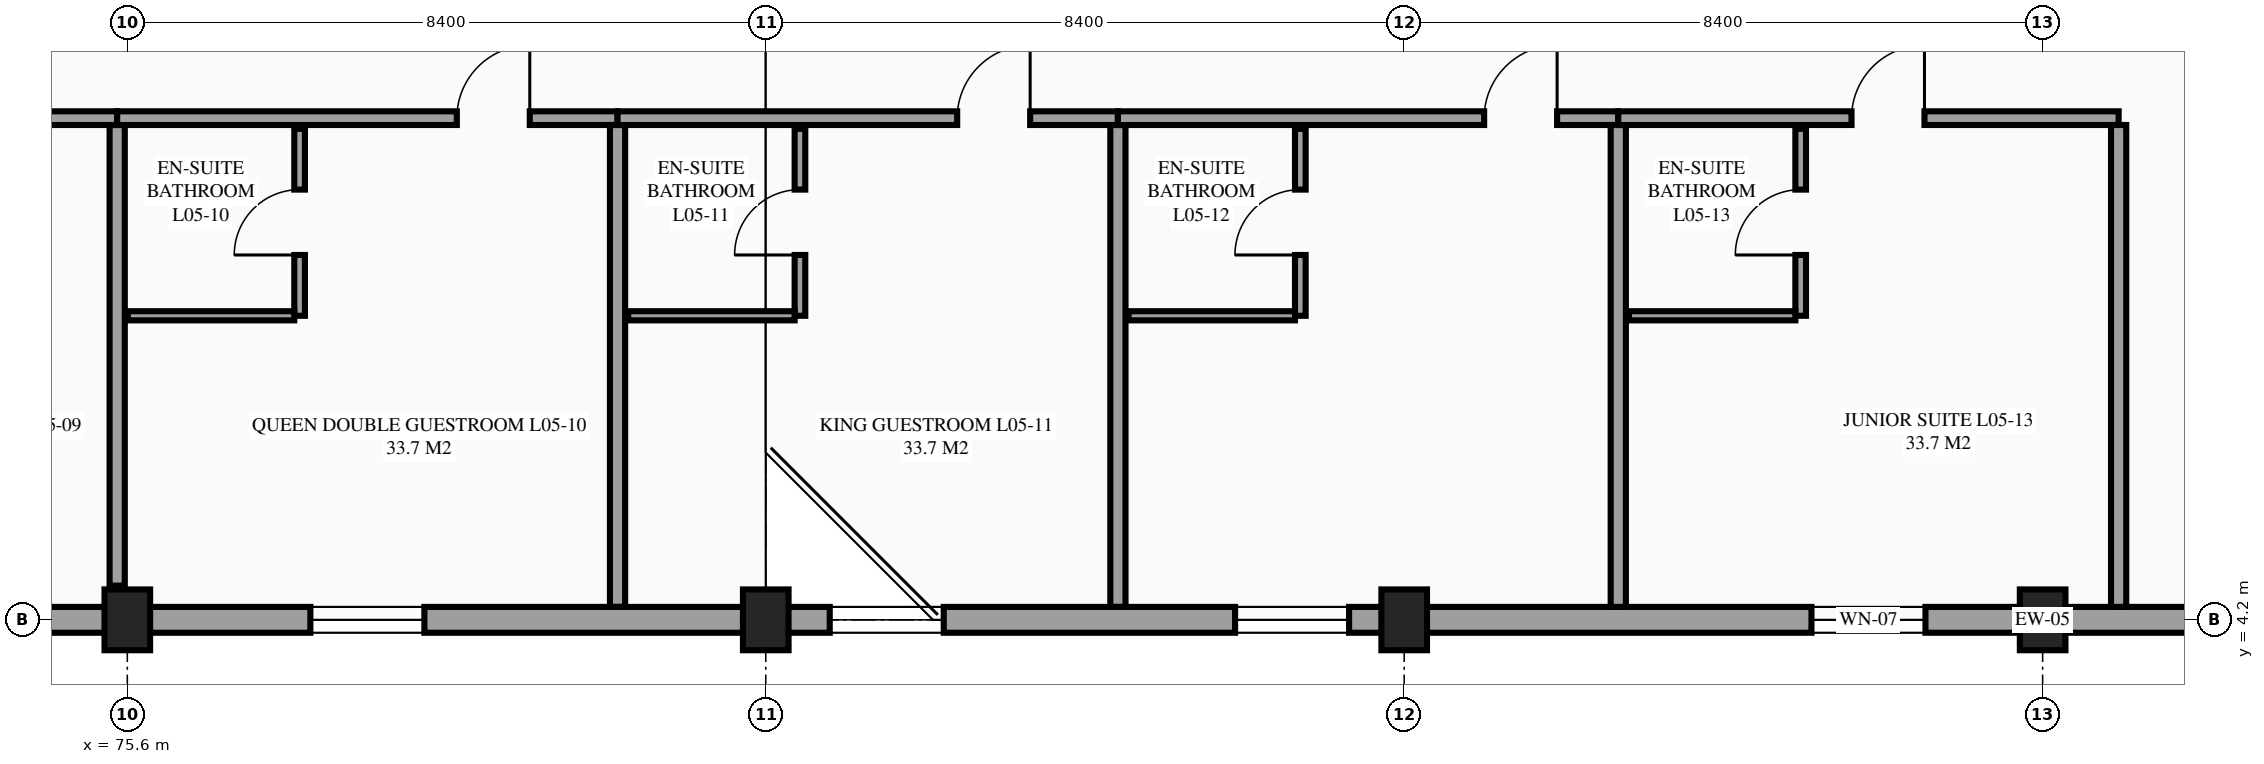
"""IFC4 building model, lengths in metres.
Left out: names, types, materials, properties, quantities, classifications, styles, units other than length and angle.
Written with IfcOpenShell. Run it as: python <this file> out.ifc"""

import sys

from ifc_helpers import new_model, si_unit, direction, frame, frame_2d, origin, origin_2d, place, context, subcontext, project, spatial, rectangle, extrude, element, fill, save


model = new_model("IFC4")
c1 = context("Model", 3, precision=1e-05, world=origin(), true_north=direction((0.0, 1.0)))
c2 = subcontext(c1, "Body", "Model", "MODEL_VIEW")
j1 = project(units=[si_unit("LENGTHUNIT", "METRE"), si_unit("PLANEANGLEUNIT", "RADIAN")], contexts=[c1])
p1 = place(None, origin())
s1 = spatial("IfcSite", under=j1, at=p1, CompositionType="ELEMENT")
p2 = place(p1, origin())
s2 = spatial("IfcBuilding", under=s1, at=p2, CompositionType="ELEMENT")
p3 = place(p2, frame((0.0, 0.0, 21.9)))
s3 = spatial("IfcBuildingStorey", under=s2, at=p3, CompositionType="ELEMENT", Elevation=21.9)
for number, where, z_axis, x_axis in (
    (1, (75.6, 4.2, 0.0), (0.0, 0.0, 1.0), (1.0, 0.0, 0.0)),
    (2, (84.0, 4.2, 0.0), (0.0, 0.0, 1.0), (1.0, 0.0, 0.0)),
    (3, (92.4, 4.2, 0.0), (0.0, 0.0, 1.0), (1.0, 0.0, 0.0)),
    (4, (100.8, 4.2, 0.0), (0.0, 0.0, 1.0), (1.0, 0.0, 0.0)),
):
    element("IfcColumn", number, at=place(p3, frame(where, z_axis=z_axis, x_axis=x_axis)), inside=s3, PredefinedType="COLUMN", context=c2, shape_type="SweptSolid", body=[
        extrude(rectangle(XDim=0.6, YDim=0.8, at=origin_2d()), origin(), (0.0, 0.0, 1.0), 3.6),
    ])
p4 = place(p3, frame((92.4, 4.2, 0.0), z_axis=(0.0, 0.0, 1.0), x_axis=(1.0, 0.0, 0.0)))
e5 = element("IfcWall", 5, at=p4, inside=s3, PredefinedType="STANDARD", context=c2, shape_type="SweptSolid", body=[
    extrude(rectangle(XDim=16.8, YDim=0.34, at=frame_2d((8.4, 0.0))), origin(), (0.0, 0.0, 1.0), 2.63),
])
p5 = place(p4, frame((5.358, 0.0, 0.85)))
e6 = element("IfcOpeningElement", 6, at=p5, cuts=e5, PredefinedType="OPENING", context=c2, shape_type="SweptSolid", body=[
    extrude(rectangle(XDim=1.5, YDim=1.5, at=frame_2d((0.75, 0.75))), frame((0.0, 0.18, 0.0), z_axis=(0.0, -1.0, 0.0), x_axis=(1.0, 0.0, 0.0)), (0.0, 0.0, 1.0), 0.36),
])
p6 = place(p3, frame((68.883, 10.8, 0.0), z_axis=(0.0, 0.0, 1.0), x_axis=(1.0, 0.0, 0.0)))
e7 = element("IfcWall", 7, at=p6, inside=s3, PredefinedType="PARTITIONING", context=c2, shape_type="SweptSolid", body=[
    extrude(rectangle(XDim=6.583, YDim=0.18, at=frame_2d((3.292, 0.0))), origin(), (0.0, 0.0, 1.0), 3.375),
])
p7 = place(p6, frame((4.469, 0.0, 0.0)))
e8 = element("IfcOpeningElement", 8, at=p7, cuts=e7, PredefinedType="OPENING", context=c2, shape_type="SweptSolid", body=[
    extrude(rectangle(XDim=0.96, YDim=2.15, at=frame_2d((0.48, 1.075))), frame((0.0, 0.1, 0.0), z_axis=(0.0, -1.0, 0.0), x_axis=(1.0, 0.0, 0.0)), (0.0, 0.0, 1.0), 0.2),
])
p8 = place(p3, frame((75.467, 4.65, 0.0), z_axis=(0.0, 0.0, 1.0), x_axis=(0.0, 1.0, 0.0)))
e9 = element("IfcWall", 9, at=p8, inside=s3, PredefinedType="PARTITIONING", context=c2, shape_type="SweptSolid", body=[
    extrude(rectangle(XDim=6.06, YDim=0.2, at=frame_2d((3.03, 0.0))), origin(), (0.0, 0.0, 1.0), 2.78),
])
p9 = place(p3, frame((75.467, 10.8, 0.0), z_axis=(0.0, 0.0, 1.0), x_axis=(1.0, 0.0, 0.0)))
e10 = element("IfcWall", 10, at=p9, inside=s3, PredefinedType="PARTITIONING", context=c2, shape_type="SweptSolid", body=[
    extrude(rectangle(XDim=6.583, YDim=0.18, at=frame_2d((3.292, 0.0))), origin(), (0.0, 0.0, 1.0), 3.375),
])
p10 = place(p9, frame((4.469, 0.0, 0.0)))
e11 = element("IfcOpeningElement", 11, at=p10, cuts=e10, PredefinedType="OPENING", context=c2, shape_type="SweptSolid", body=[
    extrude(rectangle(XDim=0.96, YDim=2.15, at=frame_2d((0.48, 1.075))), frame((0.0, 0.1, 0.0), z_axis=(0.0, -1.0, 0.0), x_axis=(1.0, 0.0, 0.0)), (0.0, 0.0, 1.0), 0.2),
])
p11 = place(p3, frame((82.05, 4.37, 0.0), z_axis=(0.0, 0.0, 1.0), x_axis=(0.0, 1.0, 0.0)))
e12 = element("IfcWall", 12, at=p11, inside=s3, PredefinedType="PARTITIONING", context=c2, shape_type="SweptSolid", body=[
    extrude(rectangle(XDim=6.34, YDim=0.2, at=frame_2d((3.17, 0.0))), origin(), (0.0, 0.0, 1.0), 3.375),
])
p12 = place(p3, frame((77.867, 8.2, 0.0), z_axis=(0.0, 0.0, 1.0), x_axis=(0.0, 1.0, 0.0)))
e13 = element("IfcWall", 13, at=p12, inside=s3, PredefinedType="PARTITIONING", context=c2, shape_type="SweptSolid", body=[
    extrude(rectangle(XDim=2.46, YDim=0.14, at=frame_2d((1.23, 0.0))), origin(), (0.0, 0.0, 1.0), 3.375),
])
p13 = place(p12, frame((0.8, 0.0, 0.0)))
e14 = element("IfcOpeningElement", 14, at=p13, cuts=e13, PredefinedType="OPENING", context=c2, shape_type="SweptSolid", body=[
    extrude(rectangle(XDim=0.86, YDim=2.1, at=frame_2d((0.43, 1.05))), frame((0.0, 0.08, 0.0), z_axis=(0.0, -1.0, 0.0), x_axis=(1.0, 0.0, 0.0)), (0.0, 0.0, 1.0), 0.16),
])
p14 = place(p3, frame((75.607, 8.2, 0.0), z_axis=(0.0, 0.0, 1.0), x_axis=(1.0, 0.0, 0.0)))
e15 = element("IfcWall", 15, at=p14, inside=s3, PredefinedType="PARTITIONING", context=c2, shape_type="SweptSolid", body=[
    extrude(rectangle(XDim=2.19, YDim=0.12, at=frame_2d((1.095, 0.0))), origin(), (0.0, 0.0, 1.0), 3.375),
])
p15 = place(p3, frame((82.05, 10.8, 0.0), z_axis=(0.0, 0.0, 1.0), x_axis=(1.0, 0.0, 0.0)))
e16 = element("IfcWall", 16, at=p15, inside=s3, PredefinedType="PARTITIONING", context=c2, shape_type="SweptSolid", body=[
    extrude(rectangle(XDim=6.583, YDim=0.18, at=frame_2d((3.292, 0.0))), origin(), (0.0, 0.0, 1.0), 3.375),
])
p16 = place(p15, frame((4.469, 0.0, 0.0)))
e17 = element("IfcOpeningElement", 17, at=p16, cuts=e16, PredefinedType="OPENING", context=c2, shape_type="SweptSolid", body=[
    extrude(rectangle(XDim=0.96, YDim=2.15, at=frame_2d((0.48, 1.075))), frame((0.0, 0.1, 0.0), z_axis=(0.0, -1.0, 0.0), x_axis=(1.0, 0.0, 0.0)), (0.0, 0.0, 1.0), 0.2),
])
p17 = place(p3, frame((88.633, 4.37, 0.0), z_axis=(0.0, 0.0, 1.0), x_axis=(0.0, 1.0, 0.0)))
e18 = element("IfcWall", 18, at=p17, inside=s3, PredefinedType="PARTITIONING", context=c2, shape_type="SweptSolid", body=[
    extrude(rectangle(XDim=6.34, YDim=0.2, at=frame_2d((3.17, 0.0))), origin(), (0.0, 0.0, 1.0), 3.375),
])
p18 = place(p3, frame((84.45, 8.2, 0.0), z_axis=(0.0, 0.0, 1.0), x_axis=(0.0, 1.0, 0.0)))
e19 = element("IfcWall", 19, at=p18, inside=s3, PredefinedType="PARTITIONING", context=c2, shape_type="SweptSolid", body=[
    extrude(rectangle(XDim=2.46, YDim=0.14, at=frame_2d((1.23, 0.0))), origin(), (0.0, 0.0, 1.0), 3.375),
])
p19 = place(p18, frame((0.8, 0.0, 0.0)))
e20 = element("IfcOpeningElement", 20, at=p19, cuts=e19, PredefinedType="OPENING", context=c2, shape_type="SweptSolid", body=[
    extrude(rectangle(XDim=0.86, YDim=2.1, at=frame_2d((0.43, 1.05))), frame((0.0, 0.08, 0.0), z_axis=(0.0, -1.0, 0.0), x_axis=(1.0, 0.0, 0.0)), (0.0, 0.0, 1.0), 0.16),
])
p20 = place(p3, frame((82.19, 8.2, 0.0), z_axis=(0.0, 0.0, 1.0), x_axis=(1.0, 0.0, 0.0)))
e21 = element("IfcWall", 21, at=p20, inside=s3, PredefinedType="PARTITIONING", context=c2, shape_type="SweptSolid", body=[
    extrude(rectangle(XDim=2.19, YDim=0.12, at=frame_2d((1.095, 0.0))), origin(), (0.0, 0.0, 1.0), 3.375),
])
p21 = place(p3, frame((88.633, 10.8, 0.0), z_axis=(0.0, 0.0, 1.0), x_axis=(1.0, 0.0, 0.0)))
e22 = element("IfcWall", 22, at=p21, inside=s3, PredefinedType="PARTITIONING", context=c2, shape_type="SweptSolid", body=[
    extrude(rectangle(XDim=6.583, YDim=0.18, at=frame_2d((3.292, 0.0))), origin(), (0.0, 0.0, 1.0), 3.375),
])
p22 = place(p21, frame((4.819, 0.0, 0.0)))
e23 = element("IfcOpeningElement", 23, at=p22, cuts=e22, PredefinedType="OPENING", context=c2, shape_type="SweptSolid", body=[
    extrude(rectangle(XDim=0.96, YDim=2.15, at=frame_2d((0.48, 1.075))), frame((0.0, 0.1, 0.0), z_axis=(0.0, -1.0, 0.0), x_axis=(1.0, 0.0, 0.0)), (0.0, 0.0, 1.0), 0.2),
])
p23 = place(p3, frame((95.217, 4.37, 0.0), z_axis=(0.0, 0.0, 1.0), x_axis=(0.0, 1.0, 0.0)))
e24 = element("IfcWall", 24, at=p23, inside=s3, PredefinedType="PARTITIONING", context=c2, shape_type="SweptSolid", body=[
    extrude(rectangle(XDim=6.34, YDim=0.2, at=frame_2d((3.17, 0.0))), origin(), (0.0, 0.0, 1.0), 3.375),
])
p24 = place(p3, frame((91.033, 8.2, 0.0), z_axis=(0.0, 0.0, 1.0), x_axis=(0.0, 1.0, 0.0)))
e25 = element("IfcWall", 25, at=p24, inside=s3, PredefinedType="PARTITIONING", context=c2, shape_type="SweptSolid", body=[
    extrude(rectangle(XDim=2.46, YDim=0.14, at=frame_2d((1.23, 0.0))), origin(), (0.0, 0.0, 1.0), 3.375),
])
p25 = place(p24, frame((0.8, 0.0, 0.0)))
e26 = element("IfcOpeningElement", 26, at=p25, cuts=e25, PredefinedType="OPENING", context=c2, shape_type="SweptSolid", body=[
    extrude(rectangle(XDim=0.86, YDim=2.1, at=frame_2d((0.43, 1.05))), frame((0.0, 0.08, 0.0), z_axis=(0.0, -1.0, 0.0), x_axis=(1.0, 0.0, 0.0)), (0.0, 0.0, 1.0), 0.16),
])
p26 = place(p3, frame((88.773, 8.2, 0.0), z_axis=(0.0, 0.0, 1.0), x_axis=(1.0, 0.0, 0.0)))
e27 = element("IfcWall", 27, at=p26, inside=s3, PredefinedType="PARTITIONING", context=c2, shape_type="SweptSolid", body=[
    extrude(rectangle(XDim=2.19, YDim=0.12, at=frame_2d((1.095, 0.0))), origin(), (0.0, 0.0, 1.0), 3.375),
])
p27 = place(p3, frame((95.217, 10.8, 0.0), z_axis=(0.0, 0.0, 1.0), x_axis=(1.0, 0.0, 0.0)))
e28 = element("IfcWall", 28, at=p27, inside=s3, PredefinedType="PARTITIONING", context=c2, shape_type="SweptSolid", body=[
    extrude(rectangle(XDim=6.583, YDim=0.18, at=frame_2d((3.292, 0.0))), origin(), (0.0, 0.0, 1.0), 3.375),
])
p28 = place(p27, frame((3.069, 0.0, 0.0)))
e29 = element("IfcOpeningElement", 29, at=p28, cuts=e28, PredefinedType="OPENING", context=c2, shape_type="SweptSolid", body=[
    extrude(rectangle(XDim=0.96, YDim=2.15, at=frame_2d((0.48, 1.075))), frame((0.0, 0.1, 0.0), z_axis=(0.0, -1.0, 0.0), x_axis=(1.0, 0.0, 0.0)), (0.0, 0.0, 1.0), 0.2),
])
p29 = place(p3, frame((101.8, 4.37, 0.0), z_axis=(0.0, 0.0, 1.0), x_axis=(0.0, 1.0, 0.0)))
e30 = element("IfcWall", 30, at=p29, inside=s3, PredefinedType="PARTITIONING", context=c2, shape_type="SweptSolid", body=[
    extrude(rectangle(XDim=6.34, YDim=0.2, at=frame_2d((3.17, 0.0))), origin(), (0.0, 0.0, 1.0), 3.375),
])
p30 = place(p3, frame((97.617, 8.2, 0.0), z_axis=(0.0, 0.0, 1.0), x_axis=(0.0, 1.0, 0.0)))
e31 = element("IfcWall", 31, at=p30, inside=s3, PredefinedType="PARTITIONING", context=c2, shape_type="SweptSolid", body=[
    extrude(rectangle(XDim=2.46, YDim=0.14, at=frame_2d((1.23, 0.0))), origin(), (0.0, 0.0, 1.0), 3.375),
])
p31 = place(p30, frame((0.8, 0.0, 0.0)))
e32 = element("IfcOpeningElement", 32, at=p31, cuts=e31, PredefinedType="OPENING", context=c2, shape_type="SweptSolid", body=[
    extrude(rectangle(XDim=0.86, YDim=2.1, at=frame_2d((0.43, 1.05))), frame((0.0, 0.08, 0.0), z_axis=(0.0, -1.0, 0.0), x_axis=(1.0, 0.0, 0.0)), (0.0, 0.0, 1.0), 0.16),
])
p32 = place(p3, frame((95.357, 8.2, 0.0), z_axis=(0.0, 0.0, 1.0), x_axis=(1.0, 0.0, 0.0)))
e33 = element("IfcWall", 33, at=p32, inside=s3, PredefinedType="PARTITIONING", context=c2, shape_type="SweptSolid", body=[
    extrude(rectangle(XDim=2.19, YDim=0.12, at=frame_2d((1.095, 0.0))), origin(), (0.0, 0.0, 1.0), 3.375),
])
p33 = place(p3, frame((67.2, 4.2, 0.0), z_axis=(0.0, 0.0, 1.0), x_axis=(1.0, 0.0, 0.0)))
e34 = element("IfcWall", 34, at=p33, inside=s3, PredefinedType="STANDARD", context=c2, shape_type="SweptSolid", body=[
    extrude(rectangle(XDim=8.4, YDim=0.34, at=frame_2d((4.2, 0.0))), origin(), (0.0, 0.0, 1.0), 2.48),
])
p34 = place(p33, frame((4.225, 0.0, 0.85)))
e35 = element("IfcOpeningElement", 35, at=p34, cuts=e34, PredefinedType="OPENING", context=c2, shape_type="SweptSolid", body=[
    extrude(rectangle(XDim=1.5, YDim=1.5, at=frame_2d((0.75, 0.75))), frame((0.0, 0.18, 0.0), z_axis=(0.0, -1.0, 0.0), x_axis=(1.0, 0.0, 0.0)), (0.0, 0.0, 1.0), 0.36),
])
p35 = place(p3, frame((75.6, 4.2, 0.0), z_axis=(0.0, 0.0, 1.0), x_axis=(1.0, 0.0, 0.0)))
e36 = element("IfcWall", 36, at=p35, inside=s3, PredefinedType="STANDARD", context=c2, shape_type="SweptSolid", body=[
    extrude(rectangle(XDim=8.4, YDim=0.34, at=frame_2d((4.2, 0.0))), origin(), (0.0, 0.0, 1.0), 2.58),
])
p36 = place(p35, frame((2.408, 0.0, 0.85)))
e37 = element("IfcOpeningElement", 37, at=p36, cuts=e36, PredefinedType="OPENING", context=c2, shape_type="SweptSolid", body=[
    extrude(rectangle(XDim=1.5, YDim=1.5, at=frame_2d((0.75, 0.75))), frame((0.0, 0.18, 0.0), z_axis=(0.0, -1.0, 0.0), x_axis=(1.0, 0.0, 0.0)), (0.0, 0.0, 1.0), 0.36),
])
p37 = place(p3, frame((84.0, 4.2, 0.0), z_axis=(0.0, 0.0, 1.0), x_axis=(1.0, 0.0, 0.0)))
e38 = element("IfcWall", 38, at=p37, inside=s3, PredefinedType="STANDARD", context=c2, shape_type="SweptSolid", body=[
    extrude(rectangle(XDim=8.4, YDim=0.34, at=frame_2d((4.2, 0.0))), origin(), (0.0, 0.0, 1.0), 3.126),
])
p38 = place(p37, frame((0.842, 0.0, 0.85)))
e39 = element("IfcOpeningElement", 39, at=p38, cuts=e38, PredefinedType="OPENING", context=c2, shape_type="SweptSolid", body=[
    extrude(rectangle(XDim=1.5, YDim=1.5, at=frame_2d((0.75, 0.75))), frame((0.0, 0.18, 0.0), z_axis=(0.0, -1.0, 0.0), x_axis=(1.0, 0.0, 0.0)), (0.0, 0.0, 1.0), 0.36),
])
p39 = place(p37, frame((6.175, 0.0, 0.85)))
e40 = element("IfcOpeningElement", 40, at=p39, cuts=e38, PredefinedType="OPENING", context=c2, shape_type="SweptSolid", body=[
    extrude(rectangle(XDim=1.5, YDim=1.5, at=frame_2d((0.75, 0.75))), frame((0.0, 0.18, 0.0), z_axis=(0.0, -1.0, 0.0), x_axis=(1.0, 0.0, 0.0)), (0.0, 0.0, 1.0), 0.36),
])
p40 = place(p36, origin())
e41 = element("IfcWindow", 41, at=p40, inside=s3, PartitioningType="SINGLE_PANEL", PredefinedType="WINDOW", context=c2, shape_type="SweptSolid", body=[
    extrude(rectangle(XDim=1.5, YDim=1.5, at=frame_2d((0.75, 0.75))), frame((0.0, 0.03, 0.0), z_axis=(0.0, -1.0, 0.0), x_axis=(1.0, 0.0, 0.0)), (0.0, 0.0, 1.0), 0.06),
])
fill(e37, e41)
p41 = place(p38, origin())
e42 = element("IfcWindow", 42, at=p41, inside=s3, PartitioningType="SINGLE_PANEL", PredefinedType="WINDOW", context=c2, shape_type="SweptSolid", body=[
    extrude(rectangle(XDim=1.5, YDim=1.5, at=frame_2d((0.75, 0.75))), frame((0.0, 0.03, 0.0), z_axis=(0.0, -1.0, 0.0), x_axis=(1.0, 0.0, 0.0)), (0.0, 0.0, 1.0), 0.06),
])
fill(e39, e42)
p42 = place(p39, origin())
e43 = element("IfcWindow", 43, at=p42, inside=s3, PartitioningType="SINGLE_PANEL", PredefinedType="WINDOW", context=c2, shape_type="SweptSolid", body=[
    extrude(rectangle(XDim=1.5, YDim=1.5, at=frame_2d((0.75, 0.75))), frame((0.0, 0.03, 0.0), z_axis=(0.0, -1.0, 0.0), x_axis=(1.0, 0.0, 0.0)), (0.0, 0.0, 1.0), 0.06),
])
fill(e40, e43)
p43 = place(p5, origin())
e44 = element("IfcWindow", 44, at=p43, inside=s3, PartitioningType="SINGLE_PANEL", PredefinedType="WINDOW", context=c2, shape_type="SweptSolid", body=[
    extrude(rectangle(XDim=1.5, YDim=1.5, at=frame_2d((0.75, 0.75))), frame((0.0, 0.03, 0.0), z_axis=(0.0, -1.0, 0.0), x_axis=(1.0, 0.0, 0.0)), (0.0, 0.0, 1.0), 0.06),
])
fill(e6, e44)
p44 = place(p10, origin())
e45 = element("IfcDoor", 45, at=p44, inside=s3, OperationType="SINGLE_SWING_RIGHT", PredefinedType="DOOR", context=c2, shape_type="SweptSolid", body=[
    extrude(rectangle(XDim=0.96, YDim=2.15, at=frame_2d((0.48, 1.075))), frame((0.0, 0.025, 0.0), z_axis=(0.0, -1.0, 0.0), x_axis=(1.0, 0.0, 0.0)), (0.0, 0.0, 1.0), 0.05),
])
fill(e11, e45)
p45 = place(p13, origin())
e46 = element("IfcDoor", 46, at=p45, inside=s3, OperationType="SINGLE_SWING_LEFT", PredefinedType="DOOR", context=c2, shape_type="SweptSolid", body=[
    extrude(rectangle(XDim=0.86, YDim=2.1, at=frame_2d((0.43, 1.05))), frame((0.0, 0.025, 0.0), z_axis=(0.0, -1.0, 0.0), x_axis=(1.0, 0.0, 0.0)), (0.0, 0.0, 1.0), 0.05),
])
fill(e14, e46)
p46 = place(p16, origin())
e47 = element("IfcDoor", 47, at=p46, inside=s3, OperationType="SINGLE_SWING_RIGHT", PredefinedType="DOOR", context=c2, shape_type="SweptSolid", body=[
    extrude(rectangle(XDim=0.96, YDim=2.15, at=frame_2d((0.48, 1.075))), frame((0.0, 0.025, 0.0), z_axis=(0.0, -1.0, 0.0), x_axis=(1.0, 0.0, 0.0)), (0.0, 0.0, 1.0), 0.05),
])
fill(e17, e47)
p47 = place(p19, origin())
e48 = element("IfcDoor", 48, at=p47, inside=s3, OperationType="SINGLE_SWING_LEFT", PredefinedType="DOOR", context=c2, shape_type="SweptSolid", body=[
    extrude(rectangle(XDim=0.86, YDim=2.1, at=frame_2d((0.43, 1.05))), frame((0.0, 0.025, 0.0), z_axis=(0.0, -1.0, 0.0), x_axis=(1.0, 0.0, 0.0)), (0.0, 0.0, 1.0), 0.05),
])
fill(e20, e48)
p48 = place(p22, origin())
e49 = element("IfcDoor", 49, at=p48, inside=s3, OperationType="SINGLE_SWING_RIGHT", PredefinedType="DOOR", context=c2, shape_type="SweptSolid", body=[
    extrude(rectangle(XDim=0.96, YDim=2.15, at=frame_2d((0.48, 1.075))), frame((0.0, 0.025, 0.0), z_axis=(0.0, -1.0, 0.0), x_axis=(1.0, 0.0, 0.0)), (0.0, 0.0, 1.0), 0.05),
])
fill(e23, e49)
p49 = place(p25, origin())
e50 = element("IfcDoor", 50, at=p49, inside=s3, OperationType="SINGLE_SWING_LEFT", PredefinedType="DOOR", context=c2, shape_type="SweptSolid", body=[
    extrude(rectangle(XDim=0.86, YDim=2.1, at=frame_2d((0.43, 1.05))), frame((0.0, 0.025, 0.0), z_axis=(0.0, -1.0, 0.0), x_axis=(1.0, 0.0, 0.0)), (0.0, 0.0, 1.0), 0.05),
])
fill(e26, e50)
p50 = place(p28, origin())
e51 = element("IfcDoor", 51, at=p50, inside=s3, OperationType="SINGLE_SWING_RIGHT", PredefinedType="DOOR", context=c2, shape_type="SweptSolid", body=[
    extrude(rectangle(XDim=0.96, YDim=2.15, at=frame_2d((0.48, 1.075))), frame((0.0, 0.025, 0.0), z_axis=(0.0, -1.0, 0.0), x_axis=(1.0, 0.0, 0.0)), (0.0, 0.0, 1.0), 0.05),
])
fill(e29, e51)
p51 = place(p31, origin())
e52 = element("IfcDoor", 52, at=p51, inside=s3, OperationType="SINGLE_SWING_LEFT", PredefinedType="DOOR", context=c2, shape_type="SweptSolid", body=[
    extrude(rectangle(XDim=0.86, YDim=2.1, at=frame_2d((0.43, 1.05))), frame((0.0, 0.025, 0.0), z_axis=(0.0, -1.0, 0.0), x_axis=(1.0, 0.0, 0.0)), (0.0, 0.0, 1.0), 0.05),
])
fill(e32, e52)
save(model, sys.argv[1])
